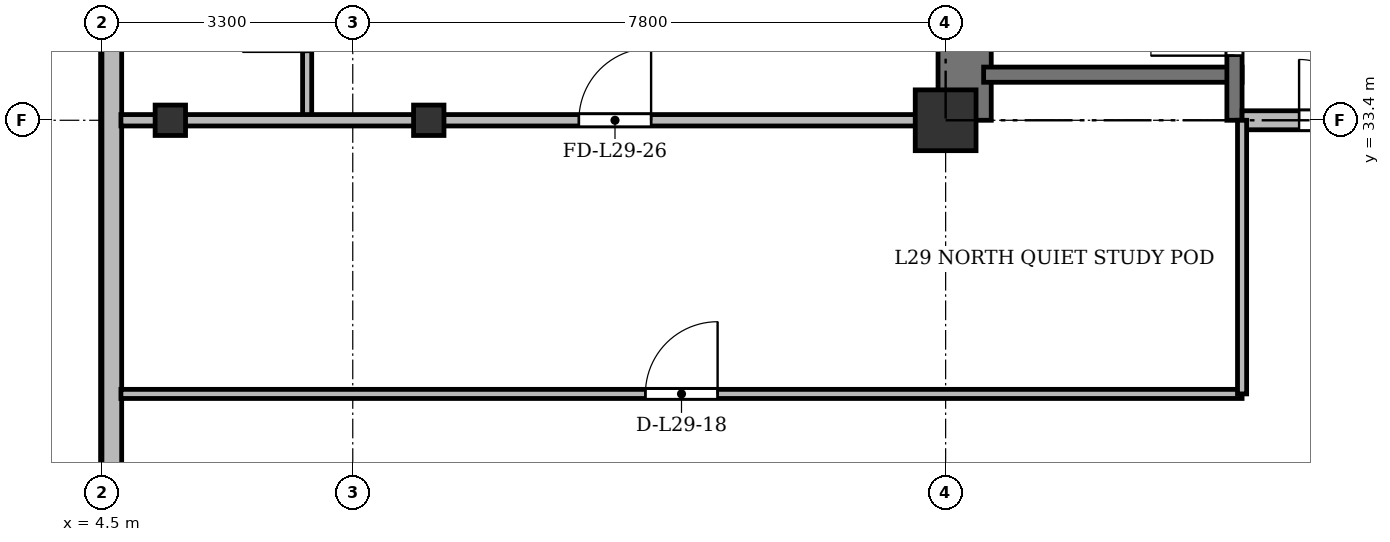
"""IFC4 building model, lengths in metres.
Left out: names, types, materials, properties, quantities, classifications, styles, units other than length and angle.
Written with IfcOpenShell. Run it as: python <this file> out.ifc"""

import sys

from ifc_helpers import new_model, si_unit, direction, frame, frame_2d, origin, origin_2d, place, context, subcontext, project, spatial, rectangle, i_section, extrude, source, transform, mapped, element, fill, save


model = new_model("IFC4")
c1 = context("Model", 3, precision=1e-05, world=origin(), true_north=direction((0.0, 1.0)))
c2 = subcontext(c1, "Body", "Model", "MODEL_VIEW")
j1 = project(units=[si_unit("LENGTHUNIT", "METRE"), si_unit("PLANEANGLEUNIT", "RADIAN")], contexts=[c1])
p1 = place(None, origin())
s1 = spatial("IfcSite", under=j1, at=p1, CompositionType="ELEMENT")
p2 = place(p1, origin())
s2 = spatial("IfcBuilding", under=s1, at=p2, CompositionType="ELEMENT")
p3 = place(p2, frame((0.0, 0.0, 114.1)))
s3 = spatial("IfcBuildingStorey", under=s2, at=p3, CompositionType="ELEMENT", Elevation=114.1)
m1 = source(origin(), c2, "Body", "SweptSolid", [
    extrude(i_section(OverallWidth=0.4, OverallDepth=0.4, WebThickness=0.022, FlangeThickness=0.035, at=origin_2d()), origin(), (0.0, 0.0, 1.0), 3.6),
])
for number, where, z_axis, x_axis in (
    (1, (5.4, 33.4, 0.0), (0.0, 0.0, 1.0), (1.0, 0.0, 0.0)),
    (2, (8.8, 33.4, 0.0), (0.0, 0.0, 1.0), (1.0, 0.0, 0.0)),
):
    element("IfcColumn", number, at=place(p3, frame(where, z_axis=z_axis, x_axis=x_axis)), inside=s3, PredefinedType="COLUMN", context=c2, shape_type="MappedRepresentation", body=[
        mapped(m1, transform((0.0, 0.0, 0.0), x_axis=(1.0, 0.0, 0.0), y_axis=(0.0, 1.0, 0.0), z_axis=(0.0, 0.0, 1.0), scale=1.0)),
    ])
m2 = source(origin(), c2, "Body", "SweptSolid", [
    extrude(rectangle(XDim=0.8, YDim=0.8, at=origin_2d()), origin(), (0.0, 0.0, 1.0), 3.6),
])
p4 = place(p3, frame((15.6, 33.4, 0.0), z_axis=(0.0, 0.0, 1.0), x_axis=(1.0, 0.0, 0.0)))
e3 = element("IfcColumn", 3, at=p4, inside=s3, PredefinedType="COLUMN", context=c2, shape_type="MappedRepresentation", body=[
    mapped(m2, transform((0.0, 0.0, 0.0), x_axis=(1.0, 0.0, 0.0), y_axis=(0.0, 1.0, 0.0), z_axis=(0.0, 0.0, 1.0), scale=1.0)),
])
p5 = place(p3, frame((4.63, 5.9, 0.0), z_axis=(0.0, 0.0, 1.0), x_axis=(0.0, 1.0, 0.0)))
e4 = element("IfcWall", 4, at=p5, inside=s3, PredefinedType="SOLIDWALL", context=c2, shape_type="SweptSolid", body=[
    extrude(rectangle(XDim=39.6, YDim=0.26, at=frame_2d((19.8, 0.0))), origin(), (0.0, 0.0, 1.0), 3.34),
])
p6 = place(p5, frame((1.45, 0.0, 0.92)))
e5 = element("IfcOpeningElement", 5, at=p6, cuts=e4, PredefinedType="OPENING", context=c2, shape_type="SweptSolid", body=[
    extrude(rectangle(XDim=1.2, YDim=1.65, at=frame_2d((0.6, 0.825))), frame((0.0, 0.14, 0.0), z_axis=(0.0, -1.0, 0.0), x_axis=(1.0, 0.0, 0.0)), (0.0, 0.0, 1.0), 0.28),
])
p7 = place(p5, frame((4.3, 0.0, 0.92)))
e6 = element("IfcOpeningElement", 6, at=p7, cuts=e4, PredefinedType="OPENING", context=c2, shape_type="SweptSolid", body=[
    extrude(rectangle(XDim=2.4, YDim=2.1, at=frame_2d((1.2, 1.05))), frame((0.0, 0.14, 0.0), z_axis=(0.0, -1.0, 0.0), x_axis=(1.0, 0.0, 0.0)), (0.0, 0.0, 1.0), 0.28),
])
p8 = place(p5, frame((8.5, 0.0, 0.92)))
e7 = element("IfcOpeningElement", 7, at=p8, cuts=e4, PredefinedType="OPENING", context=c2, shape_type="SweptSolid", body=[
    extrude(rectangle(XDim=2.4, YDim=2.1, at=frame_2d((1.2, 1.05))), frame((0.0, 0.14, 0.0), z_axis=(0.0, -1.0, 0.0), x_axis=(1.0, 0.0, 0.0)), (0.0, 0.0, 1.0), 0.28),
])
p9 = place(p5, frame((15.7, 0.0, 0.92)))
e8 = element("IfcOpeningElement", 8, at=p9, cuts=e4, PredefinedType="OPENING", context=c2, shape_type="SweptSolid", body=[
    extrude(rectangle(XDim=2.4, YDim=2.1, at=frame_2d((1.2, 1.05))), frame((0.0, 0.14, 0.0), z_axis=(0.0, -1.0, 0.0), x_axis=(1.0, 0.0, 0.0)), (0.0, 0.0, 1.0), 0.28),
])
p10 = place(p5, frame((33.9, 0.0, 0.92)))
e9 = element("IfcOpeningElement", 9, at=p10, cuts=e4, PredefinedType="OPENING", context=c2, shape_type="SweptSolid", body=[
    extrude(rectangle(XDim=1.2, YDim=1.65, at=frame_2d((0.6, 0.825))), frame((0.0, 0.14, 0.0), z_axis=(0.0, -1.0, 0.0), x_axis=(1.0, 0.0, 0.0)), (0.0, 0.0, 1.0), 0.28),
])
p11 = place(p5, frame((37.25, 0.0, 0.92)))
e10 = element("IfcOpeningElement", 10, at=p11, cuts=e4, PredefinedType="OPENING", context=c2, shape_type="SweptSolid", body=[
    extrude(rectangle(XDim=1.2, YDim=1.65, at=frame_2d((0.6, 0.825))), frame((0.0, 0.14, 0.0), z_axis=(0.0, -1.0, 0.0), x_axis=(1.0, 0.0, 0.0)), (0.0, 0.0, 1.0), 0.28),
])
p12 = place(p3, frame((15.85, 33.4, 0.0), z_axis=(0.0, 0.0, 1.0), x_axis=(0.0, 1.0, 0.0)))
e11 = element("IfcWall", 11, at=p12, inside=s3, PredefinedType="SHEAR", context=c2, shape_type="SweptSolid", body=[
    extrude(rectangle(XDim=11.7, YDim=0.7, at=frame_2d((5.85, 0.0))), origin(), (0.0, 0.0, 1.0), 3.34),
])
p13 = place(p3, frame((16.1, 34.0, 0.0), z_axis=(0.0, 0.0, 1.0), x_axis=(1.0, 0.0, 0.0)))
e12 = element("IfcWall", 12, at=p13, inside=s3, PredefinedType="SHEAR", context=c2, shape_type="SweptSolid", body=[
    extrude(rectangle(XDim=3.4, YDim=0.2, at=frame_2d((1.7, 0.0))), origin(), (0.0, 0.0, 1.0), 3.34),
])
p14 = place(p3, frame((19.4, 33.4, 0.0), z_axis=(0.0, 0.0, 1.0), x_axis=(0.0, 1.0, 0.0)))
e13 = element("IfcWall", 13, at=p14, inside=s3, PredefinedType="SHEAR", context=c2, shape_type="SweptSolid", body=[
    extrude(rectangle(XDim=11.1, YDim=0.2, at=frame_2d((5.55, 0.0))), origin(), (0.0, 0.0, 1.0), 3.34),
])
p15 = place(p14, frame((0.85, 0.0, 0.0)))
e14 = element("IfcOpeningElement", 14, at=p15, cuts=e13, PredefinedType="OPENING", context=c2, shape_type="SweptSolid", body=[
    extrude(rectangle(XDim=1.1, YDim=2.15, at=frame_2d((0.55, 1.075))), frame((0.0, 0.11, 0.0), z_axis=(0.0, -1.0, 0.0), x_axis=(1.0, 0.0, 0.0)), (0.0, 0.0, 1.0), 0.22),
])
p16 = place(p3, frame((19.5, 33.4, 0.0), z_axis=(0.0, 0.0, 1.0), x_axis=(1.0, 0.0, 0.0)))
e15 = element("IfcWall", 15, at=p16, inside=s3, PredefinedType="PARTITIONING", context=c2, shape_type="SweptSolid", body=[
    extrude(rectangle(XDim=6.8, YDim=0.25, at=frame_2d((3.4, 0.0))), origin(), (0.0, 0.0, 1.0), 2.752),
])
p17 = place(p16, frame((0.75, 0.0, 0.0)))
e16 = element("IfcOpeningElement", 16, at=p17, cuts=e15, PredefinedType="OPENING", context=c2, shape_type="SweptSolid", body=[
    extrude(rectangle(XDim=1.6, YDim=2.2, at=frame_2d((0.8, 1.1))), frame((0.0, 0.135, 0.0), z_axis=(0.0, -1.0, 0.0), x_axis=(1.0, 0.0, 0.0)), (0.0, 0.0, 1.0), 0.27),
])
p18 = place(p3, frame((4.75, 29.8, 0.0), z_axis=(0.0, 0.0, 1.0), x_axis=(1.0, 0.0, 0.0)))
e17 = element("IfcWall", 17, at=p18, inside=s3, PredefinedType="PARTITIONING", context=c2, shape_type="SweptSolid", body=[
    extrude(rectangle(XDim=14.75, YDim=0.12, at=frame_2d((7.375, 0.0))), origin(), (0.0, 0.0, 1.0), 2.84),
])
p19 = place(p18, frame((6.9, 0.0, 0.0)))
e18 = element("IfcOpeningElement", 18, at=p19, cuts=e17, PredefinedType="OPENING", context=c2, shape_type="SweptSolid", body=[
    extrude(rectangle(XDim=0.95, YDim=2.15, at=frame_2d((0.475, 1.075))), frame((0.0, 0.07, 0.0), z_axis=(0.0, -1.0, 0.0), x_axis=(1.0, 0.0, 0.0)), (0.0, 0.0, 1.0), 0.14),
])
p20 = place(p3, frame((19.5, 29.8, 0.0), z_axis=(0.0, 0.0, 1.0), x_axis=(0.0, 1.0, 0.0)))
e19 = element("IfcWall", 19, at=p20, inside=s3, PredefinedType="PARTITIONING", context=c2, shape_type="SweptSolid", body=[
    extrude(rectangle(XDim=3.6, YDim=0.12, at=frame_2d((1.8, 0.0))), origin(), (0.0, 0.0, 1.0), 2.752),
])
p21 = place(p3, frame((7.2, 33.4, 0.0), z_axis=(0.0, 0.0, 1.0), x_axis=(0.0, 1.0, 0.0)))
e20 = element("IfcWall", 20, at=p21, inside=s3, PredefinedType="PARTITIONING", context=c2, shape_type="SweptSolid", body=[
    extrude(rectangle(XDim=3.25, YDim=0.12, at=frame_2d((1.625, 0.0))), origin(), (0.0, 0.0, 1.0), 2.752),
])
p22 = place(p21, frame((0.9, 0.0, 0.0)))
e21 = element("IfcOpeningElement", 21, at=p22, cuts=e20, PredefinedType="OPENING", context=c2, shape_type="SweptSolid", body=[
    extrude(rectangle(XDim=0.85, YDim=2.1, at=frame_2d((0.425, 1.05))), frame((0.0, 0.07, 0.0), z_axis=(0.0, -1.0, 0.0), x_axis=(1.0, 0.0, 0.0)), (0.0, 0.0, 1.0), 0.14),
])
p23 = place(p3, frame((4.75, 33.4, 0.0), z_axis=(0.0, 0.0, 1.0), x_axis=(1.0, 0.0, 0.0)))
e22 = element("IfcWall", 22, at=p23, inside=s3, PredefinedType="PARTITIONING", context=c2, shape_type="SweptSolid", body=[
    extrude(rectangle(XDim=10.85, YDim=0.15, at=frame_2d((5.425, 0.0))), origin(), (0.0, 0.0, 1.0), 2.752),
])
p24 = place(p23, frame((6.025, 0.0, 0.0)))
e23 = element("IfcOpeningElement", 23, at=p24, cuts=e22, PredefinedType="OPENING", context=c2, shape_type="SweptSolid", body=[
    extrude(rectangle(XDim=0.95, YDim=2.15, at=frame_2d((0.475, 1.075))), frame((0.0, 0.085, 0.0), z_axis=(0.0, -1.0, 0.0), x_axis=(1.0, 0.0, 0.0)), (0.0, 0.0, 1.0), 0.17),
])
m3 = source(origin(), c2, "Body", "SweptSolid", [
    extrude(rectangle(XDim=1.1, YDim=2.15, at=frame_2d((0.55, 1.075))), frame((0.0, 0.025, 0.0), z_axis=(0.0, -1.0, 0.0), x_axis=(1.0, 0.0, 0.0)), (0.0, 0.0, 1.0), 0.05),
])
p25 = place(p15, origin())
e24 = element("IfcDoor", 24, at=p25, inside=s3, OperationType="SINGLE_SWING_LEFT", PredefinedType="DOOR", context=c2, shape_type="MappedRepresentation", body=[
    mapped(m3, transform((0.0, 0.0, 0.0), x_axis=(1.0, 0.0, 0.0), y_axis=(0.0, 1.0, 0.0), z_axis=(0.0, 0.0, 1.0), scale=1.0)),
])
fill(e14, e24)
m4 = source(origin(), c2, "Body", "SweptSolid", [
    extrude(rectangle(XDim=1.6, YDim=2.2, at=frame_2d((0.8, 1.1))), frame((0.0, 0.025, 0.0), z_axis=(0.0, -1.0, 0.0), x_axis=(1.0, 0.0, 0.0)), (0.0, 0.0, 1.0), 0.05),
])
p26 = place(p17, origin())
e25 = element("IfcDoor", 25, at=p26, inside=s3, OperationType="DOUBLE_DOOR_SINGLE_SWING", PredefinedType="DOOR", context=c2, shape_type="MappedRepresentation", body=[
    mapped(m4, transform((0.0, 0.0, 0.0), x_axis=(1.0, 0.0, 0.0), y_axis=(0.0, 1.0, 0.0), z_axis=(0.0, 0.0, 1.0), scale=1.0)),
])
fill(e16, e25)
m5 = source(origin(), c2, "Body", "SweptSolid", [
    extrude(rectangle(XDim=0.95, YDim=2.15, at=frame_2d((0.475, 1.075))), frame((0.0, 0.025, 0.0), z_axis=(0.0, -1.0, 0.0), x_axis=(1.0, 0.0, 0.0)), (0.0, 0.0, 1.0), 0.05),
])
p27 = place(p19, origin())
e26 = element("IfcDoor", 26, at=p27, inside=s3, OperationType="SINGLE_SWING_RIGHT", PredefinedType="DOOR", context=c2, shape_type="MappedRepresentation", body=[
    mapped(m5, transform((0.0, 0.0, 0.0), x_axis=(1.0, 0.0, 0.0), y_axis=(0.0, 1.0, 0.0), z_axis=(0.0, 0.0, 1.0), scale=1.0)),
])
fill(e18, e26)
m6 = source(origin(), c2, "Body", "SweptSolid", [
    extrude(rectangle(XDim=0.85, YDim=2.1, at=frame_2d((0.425, 1.05))), frame((0.0, 0.025, 0.0), z_axis=(0.0, -1.0, 0.0), x_axis=(1.0, 0.0, 0.0)), (0.0, 0.0, 1.0), 0.05),
])
p28 = place(p22, origin())
e27 = element("IfcDoor", 27, at=p28, inside=s3, OperationType="SINGLE_SWING_LEFT", PredefinedType="DOOR", context=c2, shape_type="MappedRepresentation", body=[
    mapped(m6, transform((0.0, 0.0, 0.0), x_axis=(1.0, 0.0, 0.0), y_axis=(0.0, 1.0, 0.0), z_axis=(0.0, 0.0, 1.0), scale=1.0)),
])
fill(e21, e27)
p29 = place(p24, origin())
e28 = element("IfcDoor", 28, at=p29, inside=s3, OperationType="SINGLE_SWING_RIGHT", PredefinedType="DOOR", context=c2, shape_type="MappedRepresentation", body=[
    mapped(m5, transform((0.0, 0.0, 0.0), x_axis=(1.0, 0.0, 0.0), y_axis=(0.0, 1.0, 0.0), z_axis=(0.0, 0.0, 1.0), scale=1.0)),
])
fill(e23, e28)
save(model, sys.argv[1])
